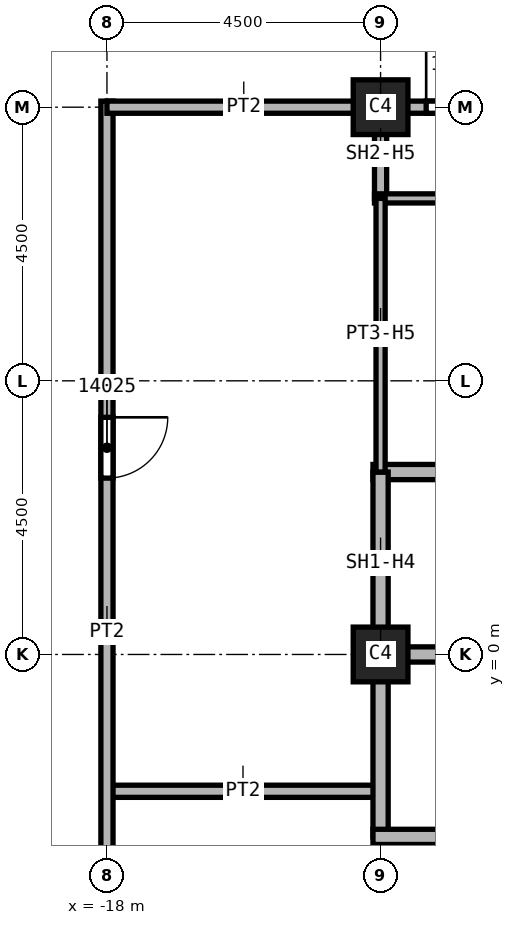
"""IFC4 building model, lengths in metres.
Left out: names, types, materials, properties, quantities, classifications, styles, units other than length and angle.
Written with IfcOpenShell. Run it as: python <this file> out.ifc"""

import sys

from ifc_helpers import new_model, si_unit, direction, frame, frame_2d, origin, origin_2d, place, context, subcontext, project, spatial, rectangle, extrude, element, fill, save


model = new_model("IFC4")
c1 = context("Model", 3, precision=1e-05, world=origin(), true_north=direction((0.0, 1.0)))
c2 = subcontext(c1, "Body", "Model", "MODEL_VIEW")
j1 = project(units=[si_unit("LENGTHUNIT", "METRE"), si_unit("PLANEANGLEUNIT", "RADIAN")], contexts=[c1])
p1 = place(None, origin())
s1 = spatial("IfcSite", under=j1, at=p1, CompositionType="ELEMENT")
p2 = place(p1, origin())
s2 = spatial("IfcBuilding", under=s1, at=p2, CompositionType="ELEMENT")
p3 = place(p2, frame((0.0, 0.0, 224.0)))
s3 = spatial("IfcBuildingStorey", under=s2, at=p3, CompositionType="ELEMENT", Elevation=224.0)
for number, where, z_axis, x_axis in (
    (1, (-13.5, 0.0, 0.0), (0.0, 0.0, 1.0), (1.0, 0.0, 0.0)),
    (2, (-13.5, 9.0, 0.0), (0.0, 0.0, 1.0), (1.0, 0.0, 0.0)),
):
    element("IfcColumn", number, at=place(p3, frame(where, z_axis=z_axis, x_axis=x_axis)), inside=s3, PredefinedType="COLUMN", context=c2, shape_type="SweptSolid", body=[
        extrude(rectangle(XDim=0.9, YDim=0.9, at=origin_2d()), origin(), (0.0, 0.0, 1.0), 3.72),
    ])
p4 = place(p3, frame((-18.0, -2.25, 0.0), z_axis=(0.0, 0.0, 1.0), x_axis=(1.0, 0.0, 0.0)))
e3 = element("IfcWall", 3, at=p4, inside=s3, PredefinedType="PARTITIONING", context=c2, shape_type="SweptSolid", body=[
    extrude(rectangle(XDim=4.5, YDim=0.2, at=frame_2d((2.25, 0.0))), origin(), (0.0, 0.0, 1.0), 3.72),
])
p5 = place(p3, frame((-18.0, 9.1, 0.0), z_axis=(0.0, 0.0, 1.0), x_axis=(0.0, -1.0, 0.0)))
e4 = element("IfcWall", 4, at=p5, inside=s3, PredefinedType="PARTITIONING", context=c2, shape_type="SweptSolid", body=[
    extrude(rectangle(XDim=18.2, YDim=0.2, at=frame_2d((9.1, 0.0))), origin(), (0.0, 0.0, 1.0), 3.72),
])
p6 = place(p5, frame((15.1, 0.0, 0.0)))
e5 = element("IfcOpeningElement", 5, at=p6, cuts=e4, PredefinedType="OPENING", context=c2, shape_type="SweptSolid", body=[
    extrude(rectangle(XDim=1.0, YDim=2.1, at=frame_2d((0.5, 1.05))), frame((0.0, 0.1, 0.0), z_axis=(0.0, -1.0, 0.0), x_axis=(1.0, 0.0, 0.0)), (0.0, 0.0, 1.0), 0.2),
])
p7 = place(p5, frame((5.2, 0.0, 0.0)))
e6 = element("IfcOpeningElement", 6, at=p7, cuts=e4, PredefinedType="OPENING", context=c2, shape_type="SweptSolid", body=[
    extrude(rectangle(XDim=1.0, YDim=2.1, at=frame_2d((0.5, 1.05))), frame((0.0, 0.1, 0.0), z_axis=(0.0, -1.0, 0.0), x_axis=(1.0, 0.0, 0.0)), (0.0, 0.0, 1.0), 0.2),
])
p8 = place(p3, frame((-13.5, 9.0, 0.0), z_axis=(0.0, 0.0, 1.0), x_axis=(-1.0, 0.0, 0.0)))
e7 = element("IfcWall", 7, at=p8, inside=s3, PredefinedType="PARTITIONING", context=c2, shape_type="SweptSolid", body=[
    extrude(rectangle(XDim=4.5, YDim=0.2, at=frame_2d((2.25, 0.0))), origin(), (0.0, 0.0, 1.0), 3.72),
])
p9 = place(p3, frame((-13.6, 9.0, 0.0), z_axis=(0.0, 0.0, 1.0), x_axis=(1.0, 0.0, 0.0)))
e8 = element("IfcWall", 8, at=p9, inside=s3, PredefinedType="SOLIDWALL", context=c2, shape_type="SweptSolid", body=[
    extrude(rectangle(XDim=3.1, YDim=0.2, at=frame_2d((1.55, 0.0))), origin(), (0.0, 0.0, 1.0), 2.958),
])
p10 = place(p9, frame((0.85, 0.0, 0.0)))
e9 = element("IfcOpeningElement", 9, at=p10, cuts=e8, PredefinedType="OPENING", context=c2, shape_type="SweptSolid", body=[
    extrude(rectangle(XDim=1.1, YDim=2.1, at=frame_2d((0.55, 1.05))), frame((0.0, 0.1, 0.0), z_axis=(0.0, -1.0, 0.0), x_axis=(1.0, 0.0, 0.0)), (0.0, 0.0, 1.0), 0.2),
])
p11 = place(p3, frame((-13.5, -4.5, 0.0), z_axis=(0.0, 0.0, 1.0), x_axis=(0.0, 1.0, 0.0)))
e10 = element("IfcWall", 10, at=p11, inside=s3, PredefinedType="SOLIDWALL", context=c2, shape_type="SweptSolid", body=[
    extrude(rectangle(XDim=1.5, YDim=0.2, at=frame_2d((0.75, 0.0))), origin(), (0.0, 0.0, 1.0), 2.958),
])
p12 = place(p3, frame((-13.5, 7.5, 0.0), z_axis=(0.0, 0.0, 1.0), x_axis=(0.0, 1.0, 0.0)))
e11 = element("IfcWall", 11, at=p12, inside=s3, PredefinedType="SOLIDWALL", context=c2, shape_type="SweptSolid", body=[
    extrude(rectangle(XDim=1.6, YDim=0.2, at=frame_2d((0.8, 0.0))), origin(), (0.0, 0.0, 1.0), 2.958),
])
p13 = place(p3, frame((-13.625, 0.0, 0.0), z_axis=(0.0, 0.0, 1.0), x_axis=(1.0, 0.0, 0.0)))
e12 = element("IfcWall", 12, at=p13, inside=s3, PredefinedType="SOLIDWALL", context=c2, shape_type="SweptSolid", body=[
    extrude(rectangle(XDim=3.125, YDim=0.25, at=frame_2d((1.562, 0.0))), origin(), (0.0, 0.0, 1.0), 3.72),
])
p14 = place(p3, frame((-13.625, 3.0, 0.0), z_axis=(0.0, 0.0, 1.0), x_axis=(1.0, 0.0, 0.0)))
e13 = element("IfcWall", 13, at=p14, inside=s3, PredefinedType="SOLIDWALL", context=c2, shape_type="SweptSolid", body=[
    extrude(rectangle(XDim=9.25, YDim=0.25, at=frame_2d((4.625, 0.0))), origin(), (0.0, 0.0, 1.0), 3.72),
])
p15 = place(p14, frame((3.25, 0.0, 0.0)))
e14 = element("IfcOpeningElement", 14, at=p15, cuts=e13, PredefinedType="OPENING", context=c2, shape_type="SweptSolid", body=[
    extrude(rectangle(XDim=1.1, YDim=2.1, at=frame_2d((0.55, 1.05))), frame((0.0, 0.125, 0.0), z_axis=(0.0, -1.0, 0.0), x_axis=(1.0, 0.0, 0.0)), (0.0, 0.0, 1.0), 0.25),
])
p16 = place(p3, frame((-13.5, -3.0, 0.0), z_axis=(0.0, 0.0, 1.0), x_axis=(0.0, 1.0, 0.0)))
e15 = element("IfcWall", 15, at=p16, inside=s3, PredefinedType="SOLIDWALL", context=c2, shape_type="SweptSolid", body=[
    extrude(rectangle(XDim=6.0, YDim=0.25, at=frame_2d((3.0, 0.0))), origin(), (0.0, 0.0, 1.0), 2.958),
])
p17 = place(p3, frame((-13.625, -3.0, 0.0), z_axis=(0.0, 0.0, 1.0), x_axis=(1.0, 0.0, 0.0)))
e16 = element("IfcWall", 16, at=p17, inside=s3, PredefinedType="SOLIDWALL", context=c2, shape_type="SweptSolid", body=[
    extrude(rectangle(XDim=6.125, YDim=0.25, at=frame_2d((3.062, 0.0))), origin(), (0.0, 0.0, 1.0), 3.72),
])
p18 = place(p17, frame((3.25, 0.0, 0.0)))
e17 = element("IfcOpeningElement", 17, at=p18, cuts=e16, PredefinedType="OPENING", context=c2, shape_type="SweptSolid", body=[
    extrude(rectangle(XDim=1.1, YDim=2.1, at=frame_2d((0.55, 1.05))), frame((0.0, 0.125, 0.0), z_axis=(0.0, -1.0, 0.0), x_axis=(1.0, 0.0, 0.0)), (0.0, 0.0, 1.0), 0.25),
])
p19 = place(p3, frame((-13.6, 7.5, 0.0), z_axis=(0.0, 0.0, 1.0), x_axis=(1.0, 0.0, 0.0)))
e18 = element("IfcWall", 18, at=p19, inside=s3, PredefinedType="PARTITIONING", context=c2, shape_type="SweptSolid", body=[
    extrude(rectangle(XDim=3.1, YDim=0.15, at=frame_2d((1.55, 0.0))), origin(), (0.0, 0.0, 1.0), 3.72),
])
p20 = place(p3, frame((-13.5, 3.0, 0.0), z_axis=(0.0, 0.0, 1.0), x_axis=(0.0, 1.0, 0.0)))
e19 = element("IfcWall", 19, at=p20, inside=s3, PredefinedType="PARTITIONING", context=c2, shape_type="SweptSolid", body=[
    extrude(rectangle(XDim=4.5, YDim=0.15, at=frame_2d((2.25, 0.0))), origin(), (0.0, 0.0, 1.0), 2.958),
])
p21 = place(p10, origin())
e20 = element("IfcDoor", 20, at=p21, inside=s3, OperationType="SINGLE_SWING_RIGHT", PredefinedType="DOOR", context=c2, shape_type="SweptSolid", body=[
    extrude(rectangle(XDim=1.1, YDim=2.1, at=frame_2d((0.55, 1.05))), frame((0.0, 0.025, 0.0), z_axis=(0.0, -1.0, 0.0), x_axis=(1.0, 0.0, 0.0)), (0.0, 0.0, 1.0), 0.05),
])
fill(e9, e20)
p22 = place(p7, origin())
e21 = element("IfcDoor", 21, at=p22, inside=s3, OperationType="SINGLE_SWING_RIGHT", PredefinedType="DOOR", context=c2, shape_type="SweptSolid", body=[
    extrude(rectangle(XDim=1.0, YDim=2.1, at=frame_2d((0.5, 1.05))), frame((0.0, 0.025, 0.0), z_axis=(0.0, -1.0, 0.0), x_axis=(1.0, 0.0, 0.0)), (0.0, 0.0, 1.0), 0.05),
])
fill(e6, e21)
save(model, sys.argv[1])
